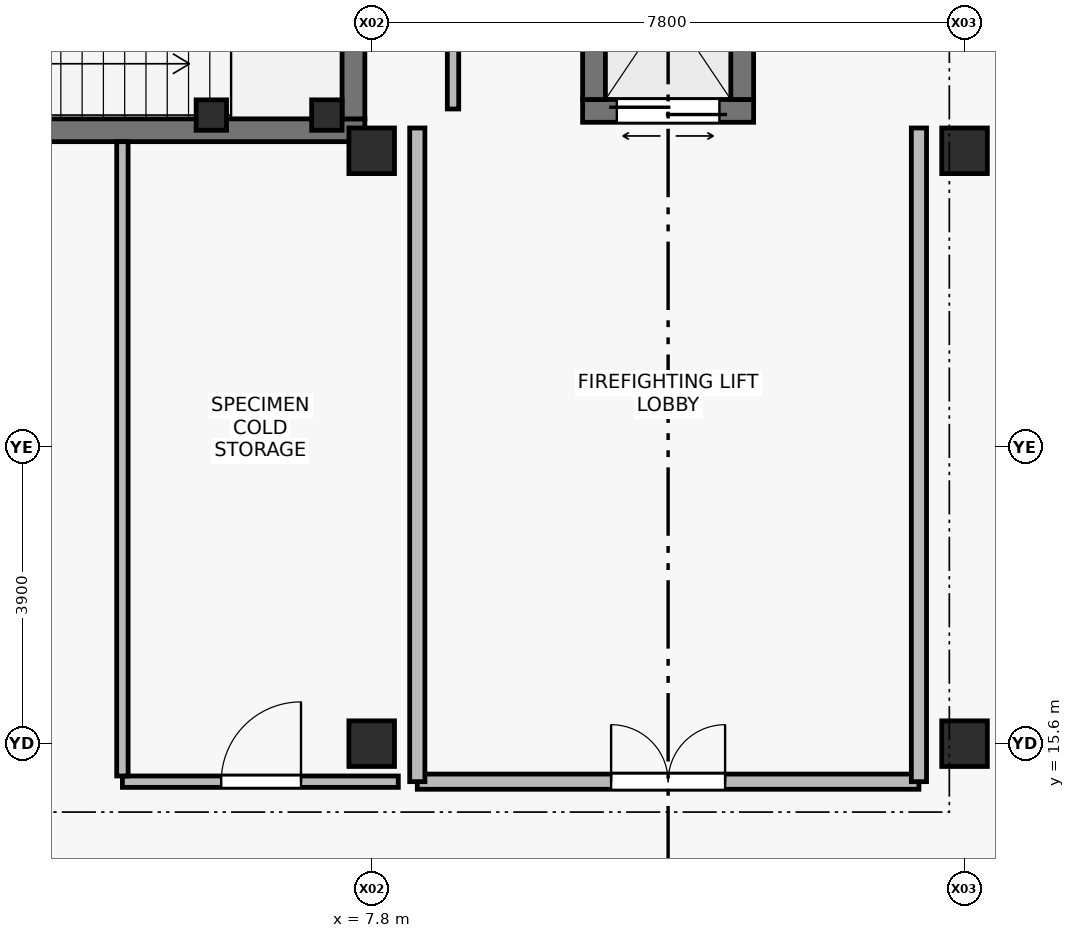
"""IFC4 building model, lengths in metres.
Left out: names, types, materials, properties, quantities, classifications, styles, units other than length and angle.
Written with IfcOpenShell. Run it as: python <this file> out.ifc"""

import sys

from ifc_helpers import new_model, si_unit, direction, frame, frame_2d, origin, origin_2d, place, context, subcontext, project, spatial, rectangle, extrude, element, fill, save


model = new_model("IFC4")
c1 = context("Model", 3, precision=1e-05, world=origin(), true_north=direction((0.0, 1.0)))
c2 = subcontext(c1, "Body", "Model", "MODEL_VIEW")
j1 = project(units=[si_unit("LENGTHUNIT", "METRE"), si_unit("PLANEANGLEUNIT", "RADIAN")], contexts=[c1])
p1 = place(None, origin())
s1 = spatial("IfcSite", under=j1, at=p1, CompositionType="ELEMENT")
p2 = place(p1, origin())
s2 = spatial("IfcBuilding", under=s1, at=p2, CompositionType="ELEMENT")
p3 = place(p2, frame((0.0, 0.0, 4.8)))
s3 = spatial("IfcBuildingStorey", under=s2, at=p3, CompositionType="ELEMENT", Elevation=4.8)
for number, where, z_axis, x_axis in (
    (1, (7.8, 15.6, 0.0), (0.0, 0.0, 1.0), (1.0, 0.0, 0.0)),
    (2, (7.8, 23.4, 0.0), (0.0, 0.0, 1.0), (1.0, 0.0, 0.0)),
    (3, (15.6, 15.6, 0.0), (0.0, 0.0, 1.0), (1.0, 0.0, 0.0)),
    (4, (15.6, 23.4, 0.0), (0.0, 0.0, 1.0), (1.0, 0.0, 0.0)),
):
    element("IfcColumn", number, at=place(p3, frame(where, z_axis=z_axis, x_axis=x_axis)), inside=s3, PredefinedType="COLUMN", context=c2, shape_type="SweptSolid", body=[
        extrude(rectangle(XDim=0.6, YDim=0.6, at=origin_2d()), origin(), (0.0, 0.0, 1.0), 4.8),
    ])
for number, where, z_axis, x_axis in (
    (5, (5.69, 23.87, 0.0), (0.0, 0.0, 1.0), (1.0, 0.0, 0.0)),
    (6, (7.21, 23.87, 0.0), (0.0, 0.0, 1.0), (1.0, 0.0, 0.0)),
):
    element("IfcColumn", number, at=place(p3, frame(where, z_axis=z_axis, x_axis=x_axis)), inside=s3, PredefinedType="COLUMN", context=c2, shape_type="SweptSolid", body=[
        extrude(rectangle(XDim=0.4, YDim=0.4, at=origin_2d()), origin(), (0.0, 0.0, 1.0), 4.8),
    ])
p4 = place(p3, frame((0.15, 23.67, 0.0), z_axis=(0.0, 0.0, 1.0), x_axis=(1.0, 0.0, 0.0)))
e7 = element("IfcWall", 7, at=p4, inside=s3, PredefinedType="SHEAR", context=c2, shape_type="SweptSolid", body=[
    extrude(rectangle(XDim=7.56, YDim=0.3, at=frame_2d((3.78, 0.0))), origin(), (0.0, 0.0, 1.0), 4.54),
])
p5 = place(p4, frame((0.56, 0.0, 0.0)))
e8 = element("IfcOpeningElement", 8, at=p5, cuts=e7, PredefinedType="OPENING", context=c2, shape_type="SweptSolid", body=[
    extrude(rectangle(XDim=1.4, YDim=2.2, at=frame_2d((0.7, 1.1))), frame((0.0, 0.16, 0.0), z_axis=(0.0, -1.0, 0.0), x_axis=(1.0, 0.0, 0.0)), (0.0, 0.0, 1.0), 0.32),
])
p6 = place(p3, frame((7.56, 23.82, 0.0), z_axis=(0.0, 0.0, 1.0), x_axis=(0.0, 1.0, 0.0)))
e9 = element("IfcWall", 9, at=p6, inside=s3, PredefinedType="SHEAR", context=c2, shape_type="SweptSolid", body=[
    extrude(rectangle(XDim=3.33, YDim=0.3, at=frame_2d((1.665, 0.0))), origin(), (0.0, 0.0, 1.0), 4.54),
])
p7 = place(p3, frame((10.575, 23.925, 0.0), z_axis=(0.0, 0.0, 1.0), x_axis=(1.0, 0.0, 0.0)))
e10 = element("IfcWall", 10, at=p7, inside=s3, PredefinedType="SHEAR", context=c2, shape_type="SweptSolid", body=[
    extrude(rectangle(XDim=2.25, YDim=0.3, at=frame_2d((1.125, 0.0))), origin(), (0.0, 0.0, 1.0), 4.54),
])
p8 = place(p7, frame((0.45, 0.0, 0.0)))
e11 = element("IfcOpeningElement", 11, at=p8, cuts=e10, PredefinedType="OPENING", context=c2, shape_type="SweptSolid", body=[
    extrude(rectangle(XDim=1.35, YDim=2.3, at=frame_2d((0.675, 1.15))), frame((0.0, 0.16, 0.0), z_axis=(0.0, -1.0, 0.0), x_axis=(1.0, 0.0, 0.0)), (0.0, 0.0, 1.0), 0.32),
])
for number, where, z_axis, x_axis in (
    (12, (10.725, 26.525, 0.0), (0.0, 0.0, 1.0), (0.0, -1.0, 0.0)),
    (13, (12.675, 24.075, 0.0), (0.0, 0.0, 1.0), (0.0, 1.0, 0.0)),
):
    element("IfcWall", number, at=place(p3, frame(where, z_axis=z_axis, x_axis=x_axis)), inside=s3, PredefinedType="SHEAR", context=c2, shape_type="SweptSolid", body=[
        extrude(rectangle(XDim=2.45, YDim=0.3, at=frame_2d((1.225, 0.0))), origin(), (0.0, 0.0, 1.0), 4.54),
    ])
p9 = place(p3, frame((8.4, 15.1, 0.0), z_axis=(0.0, 0.0, 1.0), x_axis=(1.0, 0.0, 0.0)))
e14 = element("IfcWall", 14, at=p9, inside=s3, PredefinedType="SOLIDWALL", context=c2, shape_type="SweptSolid", body=[
    extrude(rectangle(XDim=6.6, YDim=0.2, at=frame_2d((3.3, 0.0))), origin(), (0.0, 0.0, 1.0), 4.54),
])
p10 = place(p9, frame((2.55, 0.0, 0.0)))
e15 = element("IfcOpeningElement", 15, at=p10, cuts=e14, PredefinedType="OPENING", context=c2, shape_type="SweptSolid", body=[
    extrude(rectangle(XDim=1.5, YDim=2.2, at=frame_2d((0.75, 1.1))), frame((0.0, 0.11, 0.0), z_axis=(0.0, -1.0, 0.0), x_axis=(1.0, 0.0, 0.0)), (0.0, 0.0, 1.0), 0.22),
])
for number, where, z_axis, x_axis in (
    (16, (8.4, 23.7, 0.0), (0.0, 0.0, 1.0), (0.0, -1.0, 0.0)),
    (17, (15.0, 15.1, 0.0), (0.0, 0.0, 1.0), (0.0, 1.0, 0.0)),
):
    element("IfcWall", number, at=place(p3, frame(where, z_axis=z_axis, x_axis=x_axis)), inside=s3, PredefinedType="SOLIDWALL", context=c2, shape_type="SweptSolid", body=[
        extrude(rectangle(XDim=8.6, YDim=0.2, at=frame_2d((4.3, 0.0))), origin(), (0.0, 0.0, 1.0), 4.54),
    ])
p11 = place(p3, frame((4.52, 15.1, 0.0), z_axis=(0.0, 0.0, 1.0), x_axis=(1.0, 0.0, 0.0)))
e18 = element("IfcWall", 18, at=p11, inside=s3, PredefinedType="PARTITIONING", context=c2, shape_type="SweptSolid", body=[
    extrude(rectangle(XDim=3.63, YDim=0.15, at=frame_2d((1.815, 0.0))), origin(), (0.0, 0.0, 1.0), 4.54),
])
p12 = place(p11, frame((1.3, 0.0, 0.0)))
e19 = element("IfcOpeningElement", 19, at=p12, cuts=e18, PredefinedType="OPENING", context=c2, shape_type="SweptSolid", body=[
    extrude(rectangle(XDim=1.05, YDim=2.15, at=frame_2d((0.525, 1.075))), frame((0.0, 0.085, 0.0), z_axis=(0.0, -1.0, 0.0), x_axis=(1.0, 0.0, 0.0)), (0.0, 0.0, 1.0), 0.17),
])
p13 = place(p3, frame((4.52, 15.175, 0.0), z_axis=(0.0, 0.0, 1.0), x_axis=(0.0, 1.0, 0.0)))
e20 = element("IfcWall", 20, at=p13, inside=s3, PredefinedType="PARTITIONING", context=c2, shape_type="SweptSolid", body=[
    extrude(rectangle(XDim=8.345, YDim=0.15, at=frame_2d((4.172, 0.0))), origin(), (0.0, 0.0, 1.0), 4.54),
])
p14 = place(p3, frame((8.87, 23.95, 0.0), z_axis=(0.0, 0.0, 1.0), x_axis=(0.0, 1.0, 0.0)))
e21 = element("IfcWall", 21, at=p14, inside=s3, PredefinedType="PARTITIONING", context=c2, shape_type="SweptSolid", body=[
    extrude(rectangle(XDim=3.18, YDim=0.15, at=frame_2d((1.59, 0.0))), origin(), (0.0, 0.0, 1.0), 4.54),
])
p15 = place(p8, origin())
e22 = element("IfcDoor", 22, at=p15, inside=s3, OperationType="DOUBLE_DOOR_SLIDING", PredefinedType="DOOR", context=c2, shape_type="SweptSolid", body=[
    extrude(rectangle(XDim=1.35, YDim=2.3, at=frame_2d((0.675, 1.15))), frame((0.0, 0.025, 0.0), z_axis=(0.0, -1.0, 0.0), x_axis=(1.0, 0.0, 0.0)), (0.0, 0.0, 1.0), 0.05),
])
fill(e11, e22)
p16 = place(p10, origin())
e23 = element("IfcDoor", 23, at=p16, inside=s3, OperationType="DOUBLE_DOOR_SINGLE_SWING", PredefinedType="DOOR", context=c2, shape_type="SweptSolid", body=[
    extrude(rectangle(XDim=1.5, YDim=2.2, at=frame_2d((0.75, 1.1))), frame((0.0, 0.025, 0.0), z_axis=(0.0, -1.0, 0.0), x_axis=(1.0, 0.0, 0.0)), (0.0, 0.0, 1.0), 0.05),
])
fill(e15, e23)
p17 = place(p12, origin())
e24 = element("IfcDoor", 24, at=p17, inside=s3, OperationType="SINGLE_SWING_RIGHT", PredefinedType="DOOR", context=c2, shape_type="SweptSolid", body=[
    extrude(rectangle(XDim=1.05, YDim=2.15, at=frame_2d((0.525, 1.075))), frame((0.0, 0.025, 0.0), z_axis=(0.0, -1.0, 0.0), x_axis=(1.0, 0.0, 0.0)), (0.0, 0.0, 1.0), 0.05),
])
fill(e19, e24)
save(model, sys.argv[1])
